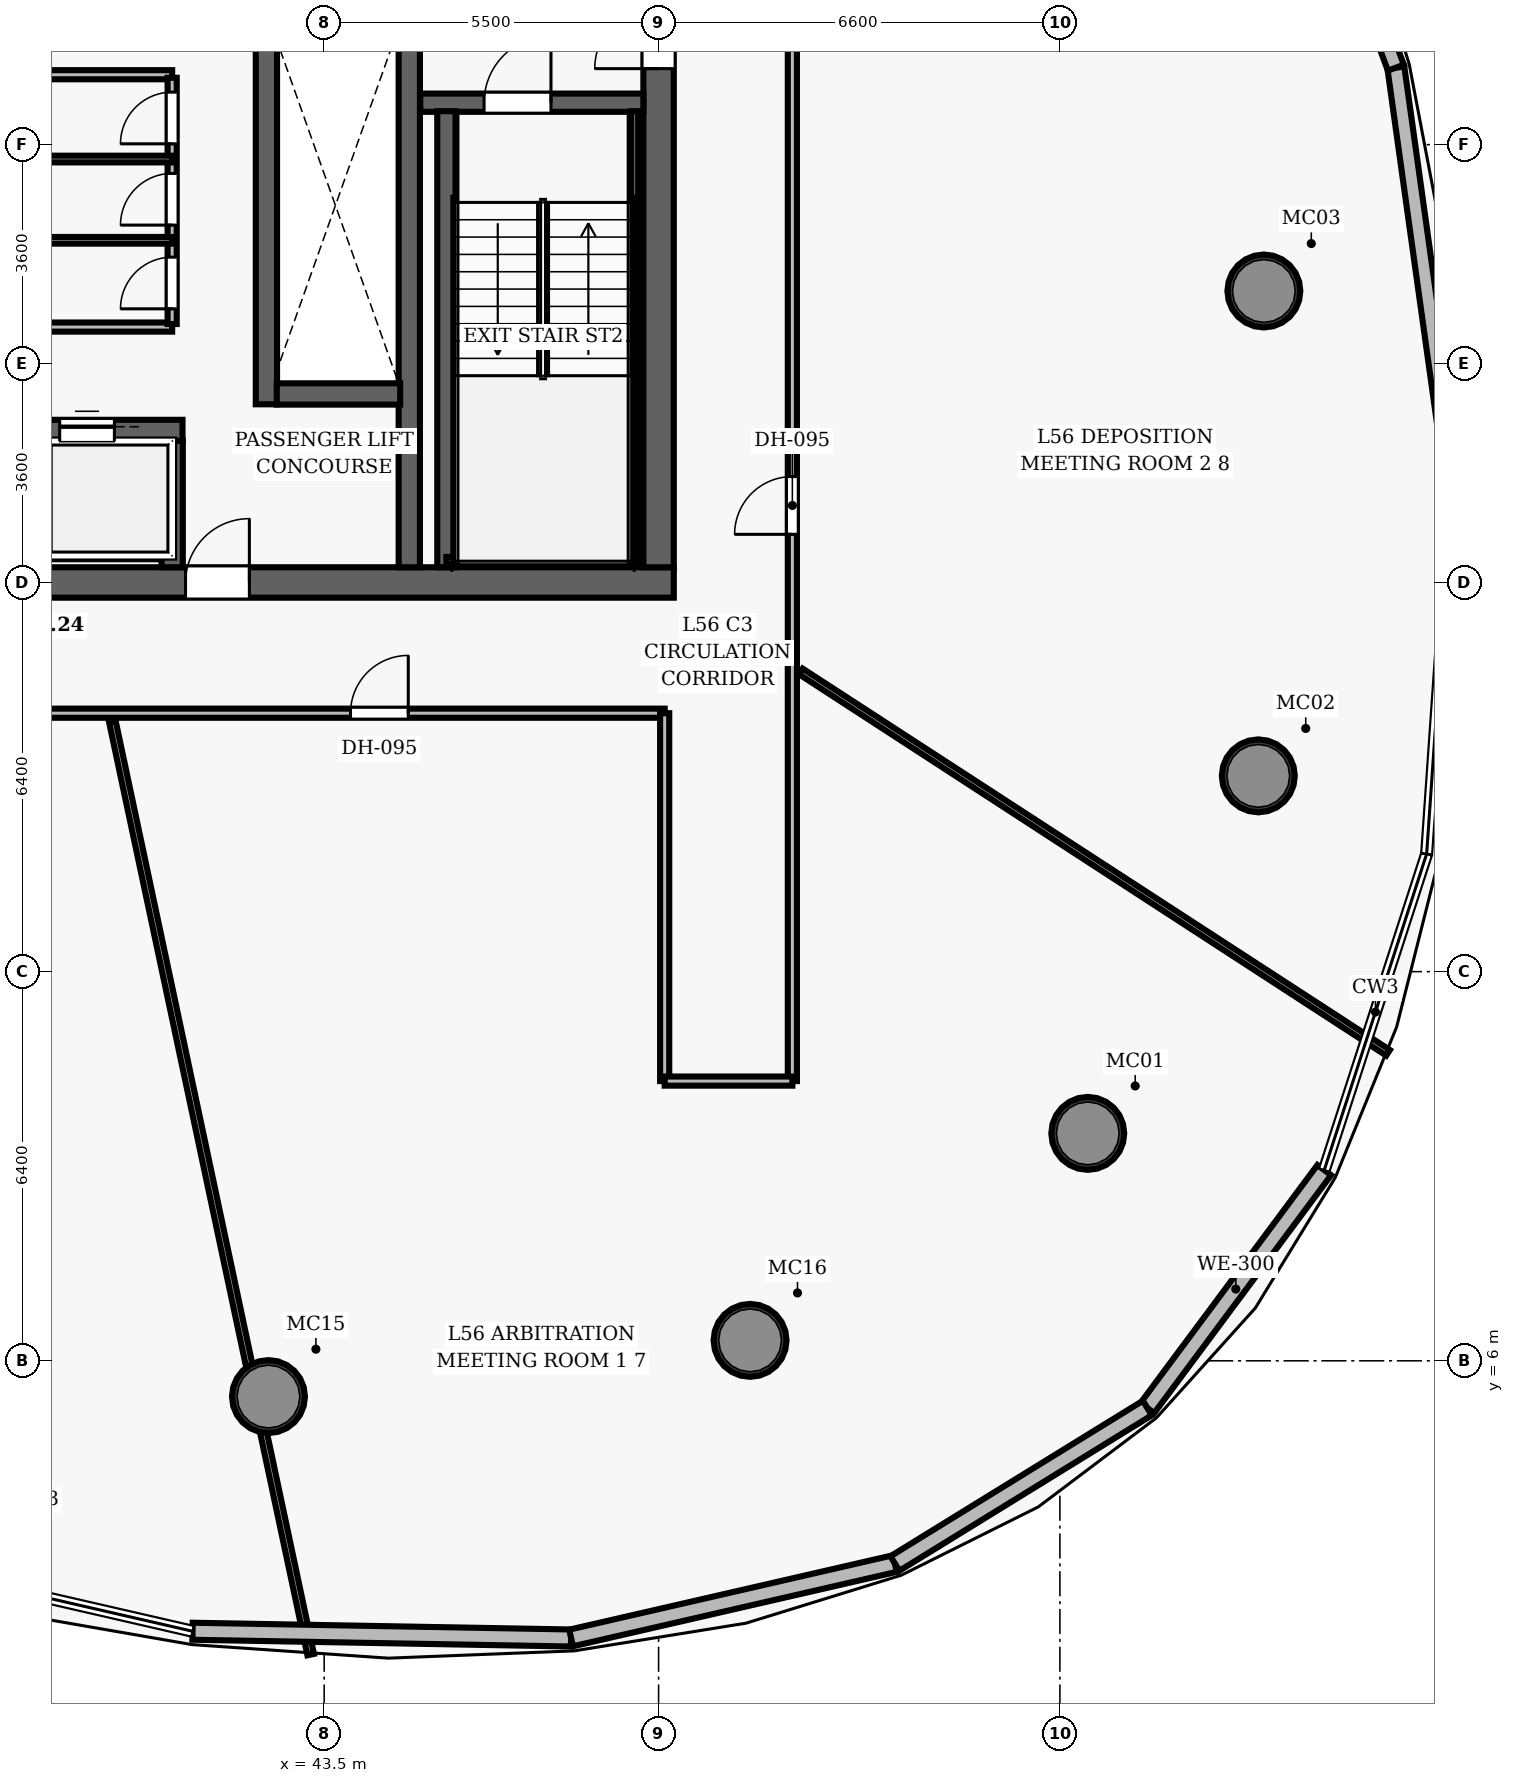
"""IFC4 building model, lengths in metres.
Left out: names, types, materials, properties, quantities, classifications, styles, units other than length and angle.
Written with IfcOpenShell. Run it as: python <this file> out.ifc"""

import sys

from ifc_helpers import new_model, si_unit, direction, frame, frame_2d, origin, origin_2d, place, context, subcontext, project, spatial, rectangle, hollow_circle, extrude, element, fill, save


model = new_model("IFC4")
c1 = context("Model", 3, precision=1e-05, world=origin(), true_north=direction((0.0, 1.0)))
c2 = subcontext(c1, "Body", "Model", "MODEL_VIEW")
j1 = project(units=[si_unit("LENGTHUNIT", "METRE"), si_unit("PLANEANGLEUNIT", "RADIAN")], contexts=[c1])
p1 = place(None, origin())
s1 = spatial("IfcSite", under=j1, at=p1, CompositionType="ELEMENT")
p2 = place(p1, origin())
s2 = spatial("IfcBuilding", under=s1, at=p2, CompositionType="ELEMENT")
p3 = place(p2, frame((0.0, 0.0, 221.25)))
s3 = spatial("IfcBuildingStorey", under=s2, at=p3, CompositionType="ELEMENT", Elevation=221.25)
p4 = place(p3, frame((26.75, 18.8, 0.0), z_axis=(0.0, 0.0, 1.0), x_axis=(1.0, 0.0, 0.0)))
e1 = element("IfcWall", 1, at=p4, inside=s3, PredefinedType="SHEAR", context=c2, shape_type="SweptSolid", body=[
    extrude(rectangle(XDim=22.5, YDim=0.5, at=frame_2d((11.25, 0.0))), origin(), (0.0, 0.0, 1.0), 3.85),
])
p5 = place(p4, frame((14.47, 0.0, 0.0)))
e2 = element("IfcOpeningElement", 2, at=p5, cuts=e1, PredefinedType="OPENING", context=c2, shape_type="SweptSolid", body=[
    extrude(rectangle(XDim=1.05, YDim=2.15, at=frame_2d((0.525, 1.075))), frame((0.0, 0.26, 0.0), z_axis=(0.0, -1.0, 0.0), x_axis=(1.0, 0.0, 0.0)), (0.0, 0.0, 1.0), 0.52),
])
p6 = place(p3, frame((49.0, 19.05, 0.0), z_axis=(0.0, 0.0, 1.0), x_axis=(0.0, 1.0, 0.0)))
e3 = element("IfcWall", 3, at=p6, inside=s3, PredefinedType="SHEAR", context=c2, shape_type="SweptSolid", body=[
    extrude(rectangle(XDim=13.9, YDim=0.5, at=frame_2d((6.95, 0.0))), origin(), (0.0, 0.0, 1.0), 3.85),
])
p7 = place(p6, frame((8.2, 0.0, 0.0)))
e4 = element("IfcOpeningElement", 4, at=p7, cuts=e3, PredefinedType="OPENING", context=c2, shape_type="SweptSolid", body=[
    extrude(rectangle(XDim=1.05, YDim=2.15, at=frame_2d((0.525, 1.075))), frame((0.0, 0.26, 0.0), z_axis=(0.0, -1.0, 0.0), x_axis=(1.0, 0.0, 0.0)), (0.0, 0.0, 1.0), 0.52),
])
p8 = place(p3, frame((44.9, 19.05, 0.0), z_axis=(0.0, 0.0, 1.0), x_axis=(0.0, 1.0, 0.0)))
e5 = element("IfcWall", 5, at=p8, inside=s3, PredefinedType="SHEAR", context=c2, shape_type="SweptSolid", body=[
    extrude(rectangle(XDim=13.9, YDim=0.35, at=frame_2d((6.95, 0.0))), origin(), (0.0, 0.0, 1.0), 3.85),
])
for number, where, z_axis, x_axis in (
    (6, (56.058, 9.74, 0.0), (0.0, 0.0, 1.0), (1.0, 0.0, 0.0)),
    (7, (58.863, 15.619, 0.0), (0.0, 0.0, 1.0), (1.0, 0.0, 0.0)),
    (8, (58.955, 23.594, 0.0), (0.0, 0.0, 1.0), (1.0, 0.0, 0.0)),
    (9, (42.584, 5.412, 0.0), (0.0, 0.0, 1.0), (1.0, 0.0, 0.0)),
    (10, (50.504, 6.336, 0.0), (0.0, 0.0, 1.0), (1.0, 0.0, 0.0)),
):
    element("IfcColumn", number, at=place(p3, frame(where, z_axis=z_axis, x_axis=x_axis)), inside=s3, PredefinedType="COLUMN", context=c2, shape_type="SweptSolid", body=[
        extrude(hollow_circle(Radius=0.6, WallThickness=0.05, at=origin_2d()), origin(), (0.0, 0.0, 1.0), 3.85),
    ])
p9 = place(p3, frame((45.08, 26.69, 0.0), z_axis=(0.0, 0.0, 1.0), x_axis=(1.0, 0.0, 0.0)))
e11 = element("IfcWall", 11, at=p9, inside=s3, PredefinedType="SHEAR", context=c2, shape_type="SweptSolid", body=[
    extrude(rectangle(XDim=3.67, YDim=0.3, at=frame_2d((1.835, 0.0))), origin(), (0.0, 0.0, 1.0), 3.85),
])
p10 = place(p9, frame((1.05, 0.0, 0.0)))
e12 = element("IfcOpeningElement", 12, at=p10, cuts=e11, PredefinedType="OPENING", context=c2, shape_type="SweptSolid", body=[
    extrude(rectangle(XDim=1.1, YDim=2.15, at=frame_2d((0.55, 1.075))), frame((0.0, 0.16, 0.0), z_axis=(0.0, -1.0, 0.0), x_axis=(1.0, 0.0, 0.0)), (0.0, 0.0, 1.0), 0.32),
])
p11 = place(p3, frame((45.51, 19.05, 0.0), z_axis=(0.0, 0.0, 1.0), x_axis=(0.0, 1.0, 0.0)))
e13 = element("IfcWall", 13, at=p11, inside=s3, PredefinedType="SHEAR", context=c2, shape_type="SweptSolid", body=[
    extrude(rectangle(XDim=7.5, YDim=0.3, at=frame_2d((3.75, 0.0))), origin(), (0.0, 0.0, 1.0), 3.85),
])
p12 = place(p3, frame((48.605, 19.1, 0.0), z_axis=(0.0, 0.0, 1.0), x_axis=(0.0, 1.0, 0.0)))
e14 = element("IfcWall", 14, at=p12, inside=s3, PredefinedType="SHEAR", context=c2, shape_type="SweptSolid", body=[
    extrude(rectangle(XDim=7.45, YDim=0.12, at=frame_2d((3.725, 0.0))), origin(), (0.0, 0.0, 1.0), 3.85),
])
p13 = place(p3, frame((45.51, 19.16, 0.0), z_axis=(0.0, 0.0, 1.0), x_axis=(1.0, 0.0, 0.0)))
e15 = element("IfcWall", 15, at=p13, inside=s3, PredefinedType="SHEAR", context=c2, shape_type="SweptSolid", body=[
    extrude(rectangle(XDim=3.095, YDim=0.12, at=frame_2d((1.547, 0.0))), origin(), (0.0, 0.0, 1.0), 3.85),
])
p14 = place(p3, frame((42.55, 21.73, 0.0), z_axis=(0.0, 0.0, 1.0), x_axis=(0.0, 1.0, 0.0)))
e16 = element("IfcWall", 16, at=p14, inside=s3, PredefinedType="SHEAR", context=c2, shape_type="SweptSolid", body=[
    extrude(rectangle(XDim=6.54, YDim=0.35, at=frame_2d((3.27, 0.0))), origin(), (0.0, 0.0, 1.0), 3.035),
])
p15 = place(p3, frame((42.72, 21.9, 0.0), z_axis=(0.0, 0.0, 1.0), x_axis=(1.0, 0.0, 0.0)))
e17 = element("IfcWall", 17, at=p15, inside=s3, PredefinedType="SHEAR", context=c2, shape_type="SweptSolid", body=[
    extrude(rectangle(XDim=2.03, YDim=0.35, at=frame_2d((1.015, 0.0))), origin(), (0.0, 0.0, 1.0), 3.035),
])
p16 = place(p3, frame((34.49, 21.3, 0.0), z_axis=(0.0, 0.0, 1.0), x_axis=(1.0, 0.0, 0.0)))
e18 = element("IfcWall", 18, at=p16, inside=s3, PredefinedType="SHEAR", context=c2, shape_type="SweptSolid", body=[
    extrude(rectangle(XDim=6.68, YDim=0.35, at=frame_2d((3.34, 0.0))), origin(), (0.0, 0.0, 1.0), 3.035),
])
p17 = place(p16, frame((0.5, 0.0, 0.0)))
e19 = element("IfcOpeningElement", 19, at=p17, cuts=e18, PredefinedType="OPENING", context=c2, shape_type="SweptSolid", body=[
    extrude(rectangle(XDim=0.9, YDim=2.15, at=frame_2d((0.45, 1.075))), frame((0.0, 0.185, 0.0), z_axis=(0.0, -1.0, 0.0), x_axis=(1.0, 0.0, 0.0)), (0.0, 0.0, 1.0), 0.37),
])
p18 = place(p16, frame((2.58, 0.0, 0.0)))
e20 = element("IfcOpeningElement", 20, at=p18, cuts=e18, PredefinedType="OPENING", context=c2, shape_type="SweptSolid", body=[
    extrude(rectangle(XDim=0.9, YDim=2.15, at=frame_2d((0.45, 1.075))), frame((0.0, 0.185, 0.0), z_axis=(0.0, -1.0, 0.0), x_axis=(1.0, 0.0, 0.0)), (0.0, 0.0, 1.0), 0.37),
])
p19 = place(p16, frame((4.66, 0.0, 0.0)))
e21 = element("IfcOpeningElement", 21, at=p19, cuts=e18, PredefinedType="OPENING", context=c2, shape_type="SweptSolid", body=[
    extrude(rectangle(XDim=0.9, YDim=2.15, at=frame_2d((0.45, 1.075))), frame((0.0, 0.185, 0.0), z_axis=(0.0, -1.0, 0.0), x_axis=(1.0, 0.0, 0.0)), (0.0, 0.0, 1.0), 0.37),
])
p20 = place(p3, frame((41.0, 19.05, 0.0), z_axis=(0.0, 0.0, 1.0), x_axis=(0.0, 1.0, 0.0)))
e22 = element("IfcWall", 22, at=p20, inside=s3, PredefinedType="SHEAR", context=c2, shape_type="SweptSolid", body=[
    extrude(rectangle(XDim=2.08, YDim=0.35, at=frame_2d((1.04, 0.0))), origin(), (0.0, 0.0, 1.0), 3.035),
])
p21 = place(p3, frame((34.75, 23.0, 0.0), z_axis=(0.0, 0.0, 1.0), x_axis=(1.0, 0.0, 0.0)))
e23 = element("IfcWall", 23, at=p21, inside=s3, PredefinedType="PARTITIONING", context=c2, shape_type="SweptSolid", body=[
    extrude(rectangle(XDim=6.25, YDim=0.15, at=frame_2d((3.125, 0.0))), origin(), (0.0, 0.0, 1.0), 3.035),
])
p22 = place(p3, frame((34.64, 27.15, 0.0), z_axis=(0.0, 0.0, 1.0), x_axis=(1.0, 0.0, 0.0)))
e24 = element("IfcWall", 24, at=p22, inside=s3, PredefinedType="PARTITIONING", context=c2, shape_type="SweptSolid", body=[
    extrude(rectangle(XDim=6.36, YDim=0.15, at=frame_2d((3.18, 0.0))), origin(), (0.0, 0.0, 1.0), 3.035),
])
p23 = place(p3, frame((41.0, 23.05, 0.0), z_axis=(0.0, 0.0, 1.0), x_axis=(0.0, 1.0, 0.0)))
e25 = element("IfcWall", 25, at=p23, inside=s3, PredefinedType="PARTITIONING", context=c2, shape_type="SweptSolid", body=[
    extrude(rectangle(XDim=4.05, YDim=0.15, at=frame_2d((2.025, 0.0))), origin(), (0.0, 0.0, 1.0), 3.035),
])
p24 = place(p23, frame((0.25, 0.0, 0.0)))
e26 = element("IfcOpeningElement", 26, at=p24, cuts=e25, PredefinedType="OPENING", context=c2, shape_type="SweptSolid", body=[
    extrude(rectangle(XDim=0.85, YDim=2.1, at=frame_2d((0.425, 1.05))), frame((0.0, 0.085, 0.0), z_axis=(0.0, -1.0, 0.0), x_axis=(1.0, 0.0, 0.0)), (0.0, 0.0, 1.0), 0.17),
])
p25 = place(p23, frame((1.627, 0.0, 0.0)))
e27 = element("IfcOpeningElement", 27, at=p25, cuts=e25, PredefinedType="OPENING", context=c2, shape_type="SweptSolid", body=[
    extrude(rectangle(XDim=0.85, YDim=2.1, at=frame_2d((0.425, 1.05))), frame((0.0, 0.085, 0.0), z_axis=(0.0, -1.0, 0.0), x_axis=(1.0, 0.0, 0.0)), (0.0, 0.0, 1.0), 0.17),
])
p26 = place(p23, frame((2.963, 0.0, 0.0)))
e28 = element("IfcOpeningElement", 28, at=p26, cuts=e25, PredefinedType="OPENING", context=c2, shape_type="SweptSolid", body=[
    extrude(rectangle(XDim=0.85, YDim=2.1, at=frame_2d((0.425, 1.05))), frame((0.0, 0.085, 0.0), z_axis=(0.0, -1.0, 0.0), x_axis=(1.0, 0.0, 0.0)), (0.0, 0.0, 1.0), 0.17),
])
for number, where, z_axis, x_axis in (
    (29, (34.75, 24.427, 0.0), (0.0, 0.0, 1.0), (1.0, 0.0, 0.0)),
    (30, (34.75, 25.763, 0.0), (0.0, 0.0, 1.0), (1.0, 0.0, 0.0)),
):
    element("IfcWall", number, at=place(p3, frame(where, z_axis=z_axis, x_axis=x_axis)), inside=s3, PredefinedType="PARTITIONING", context=c2, shape_type="SweptSolid", body=[
        extrude(rectangle(XDim=6.25, YDim=0.11, at=frame_2d((3.125, 0.0))), origin(), (0.0, 0.0, 1.0), 3.035),
    ])
p27 = place(p3, frame((26.9, 16.65, 0.0), z_axis=(0.0, 0.0, 1.0), x_axis=(1.0, 0.0, 0.0)))
e31 = element("IfcWall", 31, at=p27, inside=s3, PredefinedType="PARTITIONING", context=c2, shape_type="SweptSolid", body=[
    extrude(rectangle(XDim=22.2, YDim=0.15, at=frame_2d((11.1, 0.0))), origin(), (0.0, 0.0, 1.0), 3.035),
])
p28 = place(p27, frame((10.744, 0.0, 0.0)))
e32 = element("IfcOpeningElement", 32, at=p28, cuts=e31, PredefinedType="OPENING", context=c2, shape_type="SweptSolid", body=[
    extrude(rectangle(XDim=0.95, YDim=2.15, at=frame_2d((0.475, 1.075))), frame((0.0, 0.085, 0.0), z_axis=(0.0, -1.0, 0.0), x_axis=(1.0, 0.0, 0.0)), (0.0, 0.0, 1.0), 0.17),
])
p29 = place(p27, frame((17.033, 0.0, 0.0)))
e33 = element("IfcOpeningElement", 33, at=p29, cuts=e31, PredefinedType="OPENING", context=c2, shape_type="SweptSolid", body=[
    extrude(rectangle(XDim=0.95, YDim=2.15, at=frame_2d((0.475, 1.075))), frame((0.0, 0.085, 0.0), z_axis=(0.0, -1.0, 0.0), x_axis=(1.0, 0.0, 0.0)), (0.0, 0.0, 1.0), 0.17),
])
p30 = place(p3, frame((51.2, 10.6, 0.0), z_axis=(0.0, 0.0, 1.0), x_axis=(0.0, 1.0, 0.0)))
e34 = element("IfcWall", 34, at=p30, inside=s3, PredefinedType="PARTITIONING", context=c2, shape_type="SweptSolid", body=[
    extrude(rectangle(XDim=30.8, YDim=0.15, at=frame_2d((15.4, 0.0))), origin(), (0.0, 0.0, 1.0), 3.035),
])
p31 = place(p30, frame((20.676, 0.0, 0.0)))
e35 = element("IfcOpeningElement", 35, at=p31, cuts=e34, PredefinedType="OPENING", context=c2, shape_type="SweptSolid", body=[
    extrude(rectangle(XDim=0.95, YDim=2.15, at=frame_2d((0.475, 1.075))), frame((0.0, 0.085, 0.0), z_axis=(0.0, -1.0, 0.0), x_axis=(1.0, 0.0, 0.0)), (0.0, 0.0, 1.0), 0.17),
])
p32 = place(p30, frame((8.992, 0.0, 0.0)))
e36 = element("IfcOpeningElement", 36, at=p32, cuts=e34, PredefinedType="OPENING", context=c2, shape_type="SweptSolid", body=[
    extrude(rectangle(XDim=0.95, YDim=2.15, at=frame_2d((0.475, 1.075))), frame((0.0, 0.085, 0.0), z_axis=(0.0, -1.0, 0.0), x_axis=(1.0, 0.0, 0.0)), (0.0, 0.0, 1.0), 0.17),
])
p33 = place(p3, frame((49.1, 10.6, 0.0), z_axis=(0.0, 0.0, 1.0), x_axis=(0.0, 1.0, 0.0)))
e37 = element("IfcWall", 37, at=p33, inside=s3, PredefinedType="PARTITIONING", context=c2, shape_type="SweptSolid", body=[
    extrude(rectangle(XDim=6.05, YDim=0.15, at=frame_2d((3.025, 0.0))), origin(), (0.0, 0.0, 1.0), 3.035),
])
p34 = place(p3, frame((49.1, 10.6, 0.0), z_axis=(0.0, 0.0, 1.0), x_axis=(1.0, 0.0, 0.0)))
e38 = element("IfcWall", 38, at=p34, inside=s3, PredefinedType="PARTITIONING", context=c2, shape_type="SweptSolid", body=[
    extrude(rectangle(XDim=2.1, YDim=0.15, at=frame_2d((1.05, 0.0))), origin(), (0.0, 0.0, 1.0), 3.035),
])
p35 = place(p3, frame((40.017, 16.51, 0.0), z_axis=(0.0, 0.0, 1.0), x_axis=(0.207914047214, -0.978147099863, 0.0)))
e39 = element("IfcWall", 39, at=p35, inside=s3, PredefinedType="PARTITIONING", context=c2, shape_type="SweptSolid", body=[
    extrude(rectangle(XDim=15.684, YDim=0.11, at=frame_2d((7.842, 0.0))), origin(), (0.0, 0.0, 1.0), 3.035),
])
p36 = place(p3, frame((51.34, 17.337, 0.0), z_axis=(0.0, 0.0, 1.0), x_axis=(0.838670245997, -0.544639530771, 0.0)))
e40 = element("IfcWall", 40, at=p36, inside=s3, PredefinedType="PARTITIONING", context=c2, shape_type="SweptSolid", body=[
    extrude(rectangle(XDim=11.515, YDim=0.11, at=frame_2d((5.757, 0.0))), origin(), (0.0, 0.0, 1.0), 3.035),
])
p37 = place(p3, frame((59.948, 9.137, 0.0), z_axis=(0.0, 0.0, 1.0), x_axis=(-0.59667052694, -0.802486312831, 0.0)))
e41 = element("IfcWall", 41, at=p37, inside=s3, PredefinedType="SOLIDWALL", context=c2, shape_type="SweptSolid", body=[
    extrude(rectangle(XDim=4.876, YDim=0.28, at=frame_2d((2.438, 0.0))), origin(), (0.0, 0.0, 1.0), 3.62),
])
p38 = place(p3, frame((61.125, 27.266, 0.0), z_axis=(0.0, 0.0, 1.0), x_axis=(0.138287146669, -0.990392177406, 0.0)))
e42 = element("IfcWall", 42, at=p38, inside=s3, PredefinedType="SOLIDWALL", context=c2, shape_type="SweptSolid", body=[
    extrude(rectangle(XDim=6.785, YDim=0.28, at=frame_2d((3.392, 0.0))), origin(), (0.0, 0.0, 1.0), 3.62),
])
p39 = place(p3, frame((58.667, 33.839, 0.0), z_axis=(0.0, 0.0, 1.0), x_axis=(0.350368435695, -0.93661195768, 0.0)))
e43 = element("IfcWall", 43, at=p39, inside=s3, PredefinedType="SOLIDWALL", context=c2, shape_type="SweptSolid", body=[
    extrude(rectangle(XDim=7.018, YDim=0.28, at=frame_2d((3.509, 0.0))), origin(), (0.0, 0.0, 1.0), 3.62),
])
p40 = place(p3, frame((47.561, 1.442, 0.0), z_axis=(0.0, 0.0, 1.0), x_axis=(-0.999841547857, 0.017801100499, 0.0)))
e44 = element("IfcWall", 44, at=p40, inside=s3, PredefinedType="SOLIDWALL", context=c2, shape_type="SweptSolid", body=[
    extrude(rectangle(XDim=6.227, YDim=0.28, at=frame_2d((3.113, 0.0))), origin(), (0.0, 0.0, 1.0), 3.62),
])
p41 = place(p3, frame((52.886, 2.666, 0.0), z_axis=(0.0, 0.0, 1.0), x_axis=(-0.974584360415, -0.224020812503, 0.0)))
e45 = element("IfcWall", 45, at=p41, inside=s3, PredefinedType="SOLIDWALL", context=c2, shape_type="SweptSolid", body=[
    extrude(rectangle(XDim=5.464, YDim=0.28, at=frame_2d((2.732, 0.0))), origin(), (0.0, 0.0, 1.0), 3.62),
])
p42 = place(p3, frame((57.038, 5.223, 0.0), z_axis=(0.0, 0.0, 1.0), x_axis=(-0.851439924774, -0.524452147007, 0.0)))
e46 = element("IfcWall", 46, at=p42, inside=s3, PredefinedType="SOLIDWALL", context=c2, shape_type="SweptSolid", body=[
    extrude(rectangle(XDim=4.876, YDim=0.28, at=frame_2d((2.438, 0.0))), origin(), (0.0, 0.0, 1.0), 3.62),
])
p43 = place(p10, origin())
e47 = element("IfcDoor", 47, at=p43, inside=s3, OperationType="SINGLE_SWING_RIGHT", PredefinedType="DOOR", context=c2, shape_type="SweptSolid", body=[
    extrude(rectangle(XDim=1.1, YDim=2.15, at=frame_2d((0.55, 1.075))), frame((0.0, 0.025, 0.0), z_axis=(0.0, -1.0, 0.0), x_axis=(1.0, 0.0, 0.0)), (0.0, 0.0, 1.0), 0.05),
])
fill(e12, e47)
p44 = place(p7, origin())
e48 = element("IfcDoor", 48, at=p44, inside=s3, OperationType="SINGLE_SWING_LEFT", PredefinedType="DOOR", context=c2, shape_type="SweptSolid", body=[
    extrude(rectangle(XDim=1.05, YDim=2.15, at=frame_2d((0.525, 1.075))), frame((0.0, 0.025, 0.0), z_axis=(0.0, -1.0, 0.0), x_axis=(1.0, 0.0, 0.0)), (0.0, 0.0, 1.0), 0.05),
])
fill(e4, e48)
p45 = place(p5, origin())
e49 = element("IfcDoor", 49, at=p45, inside=s3, OperationType="SINGLE_SWING_RIGHT", PredefinedType="DOOR", context=c2, shape_type="SweptSolid", body=[
    extrude(rectangle(XDim=1.05, YDim=2.15, at=frame_2d((0.525, 1.075))), frame((0.0, 0.025, 0.0), z_axis=(0.0, -1.0, 0.0), x_axis=(1.0, 0.0, 0.0)), (0.0, 0.0, 1.0), 0.05),
])
fill(e2, e49)
p46 = place(p24, origin())
e50 = element("IfcDoor", 50, at=p46, inside=s3, OperationType="SINGLE_SWING_LEFT", PredefinedType="DOOR", context=c2, shape_type="SweptSolid", body=[
    extrude(rectangle(XDim=0.85, YDim=2.1, at=frame_2d((0.425, 1.05))), frame((0.0, 0.025, 0.0), z_axis=(0.0, -1.0, 0.0), x_axis=(1.0, 0.0, 0.0)), (0.0, 0.0, 1.0), 0.05),
])
fill(e26, e50)
p47 = place(p25, origin())
e51 = element("IfcDoor", 51, at=p47, inside=s3, OperationType="SINGLE_SWING_LEFT", PredefinedType="DOOR", context=c2, shape_type="SweptSolid", body=[
    extrude(rectangle(XDim=0.85, YDim=2.1, at=frame_2d((0.425, 1.05))), frame((0.0, 0.025, 0.0), z_axis=(0.0, -1.0, 0.0), x_axis=(1.0, 0.0, 0.0)), (0.0, 0.0, 1.0), 0.05),
])
fill(e27, e51)
p48 = place(p26, origin())
e52 = element("IfcDoor", 52, at=p48, inside=s3, OperationType="SINGLE_SWING_LEFT", PredefinedType="DOOR", context=c2, shape_type="SweptSolid", body=[
    extrude(rectangle(XDim=0.85, YDim=2.1, at=frame_2d((0.425, 1.05))), frame((0.0, 0.025, 0.0), z_axis=(0.0, -1.0, 0.0), x_axis=(1.0, 0.0, 0.0)), (0.0, 0.0, 1.0), 0.05),
])
fill(e28, e52)
p49 = place(p29, origin())
e53 = element("IfcDoor", 53, at=p49, inside=s3, OperationType="SINGLE_SWING_RIGHT", PredefinedType="DOOR", context=c2, shape_type="SweptSolid", body=[
    extrude(rectangle(XDim=0.95, YDim=2.15, at=frame_2d((0.475, 1.075))), frame((0.0, 0.025, 0.0), z_axis=(0.0, -1.0, 0.0), x_axis=(1.0, 0.0, 0.0)), (0.0, 0.0, 1.0), 0.05),
])
fill(e33, e53)
p50 = place(p32, origin())
e54 = element("IfcDoor", 54, at=p50, inside=s3, OperationType="SINGLE_SWING_LEFT", PredefinedType="DOOR", context=c2, shape_type="SweptSolid", body=[
    extrude(rectangle(XDim=0.95, YDim=2.15, at=frame_2d((0.475, 1.075))), frame((0.0, 0.025, 0.0), z_axis=(0.0, -1.0, 0.0), x_axis=(1.0, 0.0, 0.0)), (0.0, 0.0, 1.0), 0.05),
])
fill(e36, e54)
p51 = place(p19, origin())
e55 = element("IfcDoor", 55, at=p51, inside=s3, OperationType="SLIDING_TO_LEFT", PredefinedType="DOOR", context=c2, shape_type="SweptSolid", body=[
    extrude(rectangle(XDim=0.9, YDim=2.15, at=frame_2d((0.45, 1.075))), frame((0.0, 0.025, 0.0), z_axis=(0.0, -1.0, 0.0), x_axis=(1.0, 0.0, 0.0)), (0.0, 0.0, 1.0), 0.05),
])
fill(e21, e55)
save(model, sys.argv[1])
